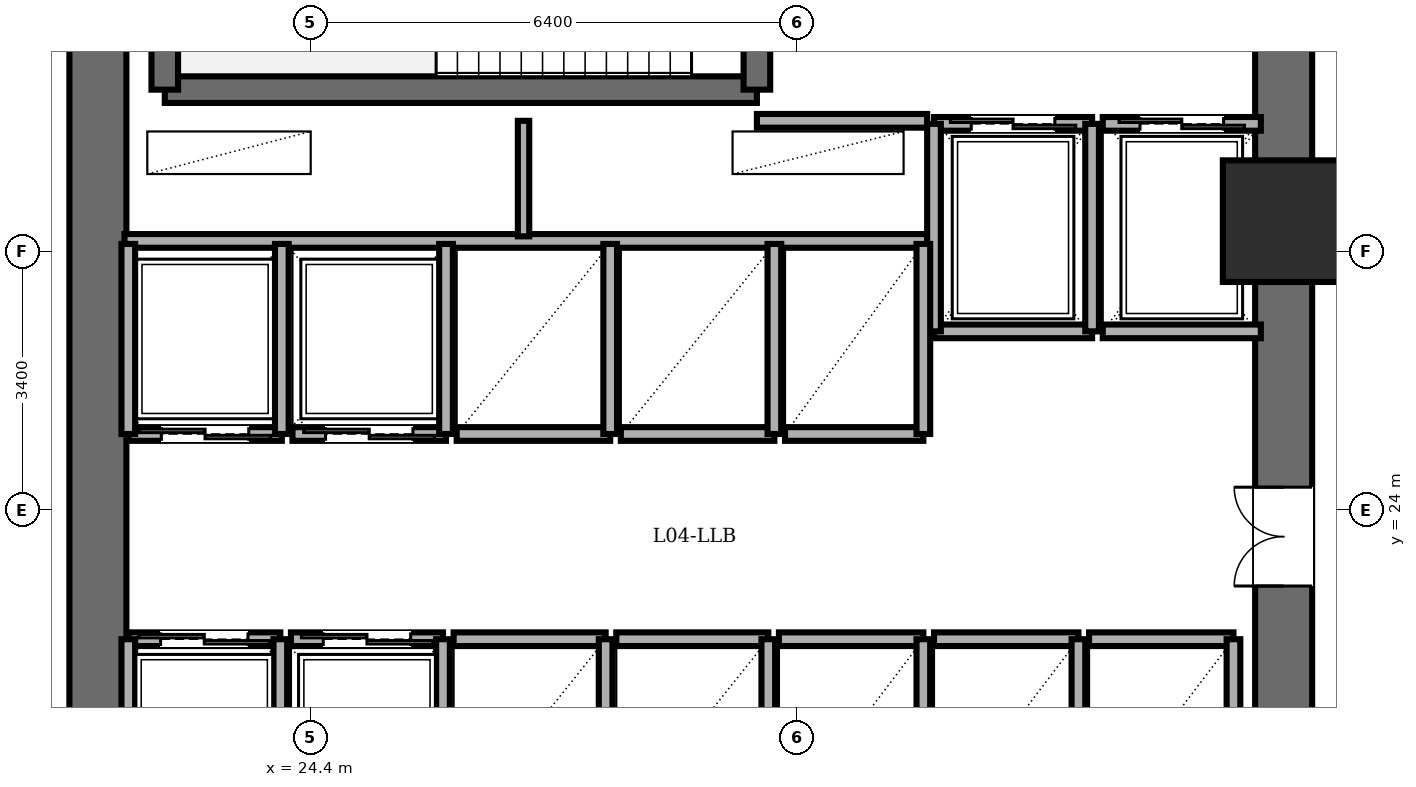
"""IFC4 building model, lengths in metres.
Left out: names, types, materials, properties, quantities, classifications, styles, units other than length and angle.
Written with IfcOpenShell. Run it as: python <this file> out.ifc"""

import sys

from ifc_helpers import new_model, si_unit, direction, frame, frame_2d, origin, origin_2d, place, context, subcontext, project, spatial, rectangle, extrude, element, fill, save


model = new_model("IFC4")
c1 = context("Model", 3, precision=1e-05, world=origin(), true_north=direction((0.0, 1.0)))
c2 = subcontext(c1, "Body", "Model", "MODEL_VIEW")
j1 = project(units=[si_unit("LENGTHUNIT", "METRE"), si_unit("PLANEANGLEUNIT", "RADIAN")], contexts=[c1])
p1 = place(None, origin())
s1 = spatial("IfcSite", under=j1, at=p1, CompositionType="ELEMENT")
p2 = place(p1, origin())
s2 = spatial("IfcBuilding", under=s1, at=p2, CompositionType="ELEMENT")
p3 = place(p2, frame((0.0, 0.0, 14.7)))
s3 = spatial("IfcBuildingStorey", under=s2, at=p3, CompositionType="ELEMENT", Elevation=14.7)
p4 = place(p3, frame((37.2, 27.8, 0.0), z_axis=(0.0, 0.0, 1.0), x_axis=(1.0, 0.0, 0.0)))
e1 = element("IfcColumn", 1, at=p4, inside=s3, PredefinedType="COLUMN", context=c2, shape_type="SweptSolid", body=[
    extrude(rectangle(XDim=1.6, YDim=1.6, at=origin_2d()), origin(), (0.0, 0.0, 1.0), 4.65),
])
p5 = place(p3, frame((21.6, 14.4, 0.0), z_axis=(0.0, 0.0, 1.0), x_axis=(0.0, 1.0, 0.0)))
e2 = element("IfcWall", 2, at=p5, inside=s3, PredefinedType="SHEAR", context=c2, shape_type="SweptSolid", body=[
    extrude(rectangle(XDim=19.2, YDim=0.75, at=frame_2d((9.6, 0.0))), origin(), (0.0, 0.0, 1.0), 4.45),
])
p6 = place(p3, frame((37.2, 14.4, 0.0), z_axis=(0.0, 0.0, 1.0), x_axis=(0.0, 1.0, 0.0)))
e3 = element("IfcWall", 3, at=p6, inside=s3, PredefinedType="SHEAR", context=c2, shape_type="SweptSolid", body=[
    extrude(rectangle(XDim=19.2, YDim=0.75, at=frame_2d((9.6, 0.0))), origin(), (0.0, 0.0, 1.0), 4.45),
])
p7 = place(p6, frame((15.8, 0.0, 0.0)))
e4 = element("IfcOpeningElement", 4, at=p7, cuts=e3, PredefinedType="OPENING", context=c2, shape_type="SweptSolid", body=[
    extrude(rectangle(XDim=1.15, YDim=2.15, at=frame_2d((0.575, 1.075))), frame((0.0, 0.385, 0.0), z_axis=(0.0, -1.0, 0.0), x_axis=(1.0, 0.0, 0.0)), (0.0, 0.0, 1.0), 0.77),
])
p8 = place(p6, frame((3.6, 0.0, 0.0)))
e5 = element("IfcOpeningElement", 5, at=p8, cuts=e3, PredefinedType="OPENING", context=c2, shape_type="SweptSolid", body=[
    extrude(rectangle(XDim=1.1, YDim=2.15, at=frame_2d((0.55, 1.075))), frame((0.0, 0.385, 0.0), z_axis=(0.0, -1.0, 0.0), x_axis=(1.0, 0.0, 0.0)), (0.0, 0.0, 1.0), 0.77),
])
p9 = place(p6, frame((8.6, 0.0, 0.0)))
e6 = element("IfcOpeningElement", 6, at=p9, cuts=e3, PredefinedType="OPENING", context=c2, shape_type="SweptSolid", body=[
    extrude(rectangle(XDim=1.3, YDim=2.2, at=frame_2d((0.65, 1.1))), frame((0.0, 0.385, 0.0), z_axis=(0.0, -1.0, 0.0), x_axis=(1.0, 0.0, 0.0)), (0.0, 0.0, 1.0), 0.77),
])
p10 = place(p3, frame((22.48, 29.53, 0.0), z_axis=(0.0, 0.0, 1.0), x_axis=(1.0, 0.0, 0.0)))
e7 = element("IfcWall", 7, at=p10, inside=s3, PredefinedType="SOLIDWALL", context=c2, shape_type="SweptSolid", body=[
    extrude(rectangle(XDim=7.79, YDim=0.35, at=frame_2d((3.895, 0.0))), origin(), (0.0, 0.0, 1.0), 4.45),
])
p11 = place(p3, frame((22.48, 29.53, 0.0), z_axis=(0.0, 0.0, 1.0), x_axis=(0.0, 1.0, 0.0)))
e8 = element("IfcWall", 8, at=p11, inside=s3, PredefinedType="SOLIDWALL", context=c2, shape_type="SweptSolid", body=[
    extrude(rectangle(XDim=3.58, YDim=0.35, at=frame_2d((1.79, 0.0))), origin(), (0.0, 0.0, 1.0), 4.45),
])
p12 = place(p3, frame((30.27, 29.53, 0.0), z_axis=(0.0, 0.0, 1.0), x_axis=(0.0, 1.0, 0.0)))
e9 = element("IfcWall", 9, at=p12, inside=s3, PredefinedType="SOLIDWALL", context=c2, shape_type="SweptSolid", body=[
    extrude(rectangle(XDim=3.58, YDim=0.35, at=frame_2d((1.79, 0.0))), origin(), (0.0, 0.0, 1.0), 4.45),
])
p13 = place(p12, frame((1.25, 0.0, 0.0)))
e10 = element("IfcOpeningElement", 10, at=p13, cuts=e9, PredefinedType="OPENING", context=c2, shape_type="SweptSolid", body=[
    extrude(rectangle(XDim=1.1, YDim=2.15, at=frame_2d((0.55, 1.075))), frame((0.0, 0.185, 0.0), z_axis=(0.0, -1.0, 0.0), x_axis=(1.0, 0.0, 0.0)), (0.0, 0.0, 1.0), 0.37),
])
p14 = place(p3, frame((30.27, 29.12, 0.0), z_axis=(0.0, 0.0, 1.0), x_axis=(1.0, 0.0, 0.0)))
e11 = element("IfcWall", 11, at=p14, inside=s3, PredefinedType="PARTITIONING", context=c2, shape_type="SweptSolid", body=[
    extrude(rectangle(XDim=2.24, YDim=0.18, at=frame_2d((1.12, 0.0))), origin(), (0.0, 0.0, 1.0), 4.45),
])
p15 = place(p3, frame((21.95, 27.54, 0.0), z_axis=(0.0, 0.0, 1.0), x_axis=(1.0, 0.0, 0.0)))
e12 = element("IfcWall", 12, at=p15, inside=s3, PredefinedType="PARTITIONING", context=c2, shape_type="SweptSolid", body=[
    extrude(rectangle(XDim=10.56, YDim=0.18, at=frame_2d((5.28, 0.0))), origin(), (0.0, 0.0, 1.0), 4.45),
])
p16 = place(p3, frame((27.2, 27.6, 0.0), z_axis=(0.0, 0.0, 1.0), x_axis=(0.0, 1.0, 0.0)))
e13 = element("IfcWall", 13, at=p16, inside=s3, PredefinedType="PARTITIONING", context=c2, shape_type="SweptSolid", body=[
    extrude(rectangle(XDim=1.52, YDim=0.15, at=frame_2d((0.76, 0.0))), origin(), (0.0, 0.0, 1.0), 4.45),
])
p17 = place(p3, frame((32.6, 29.08, 0.0), z_axis=(0.0, 0.0, 1.0), x_axis=(1.0, 0.0, 0.0)))
e14 = element("IfcWall", 14, at=p17, inside=s3, PredefinedType="PARTITIONING", context=c2, shape_type="SweptSolid", body=[
    extrude(rectangle(XDim=2.08, YDim=0.18, at=frame_2d((1.04, 0.0))), origin(), (0.0, 0.0, 1.0), 4.45),
])
p18 = place(p17, frame((0.49, 0.0, 0.0)))
e15 = element("IfcOpeningElement", 15, at=p18, cuts=e14, PredefinedType="OPENING", context=c2, shape_type="SweptSolid", body=[
    extrude(rectangle(XDim=1.1, YDim=2.2, at=frame_2d((0.55, 1.1))), frame((0.0, 0.1, 0.0), z_axis=(0.0, -1.0, 0.0), x_axis=(1.0, 0.0, 0.0)), (0.0, 0.0, 1.0), 0.2),
])
p19 = place(p3, frame((34.68, 26.35, 0.0), z_axis=(0.0, 0.0, 1.0), x_axis=(-1.0, 0.0, 0.0)))
e16 = element("IfcWall", 16, at=p19, inside=s3, PredefinedType="PARTITIONING", context=c2, shape_type="SweptSolid", body=[
    extrude(rectangle(XDim=2.08, YDim=0.18, at=frame_2d((1.04, 0.0))), origin(), (0.0, 0.0, 1.0), 4.45),
])
for number, where, z_axis, x_axis in (
    (17, (34.68, 26.35, 0.0), (0.0, 0.0, 1.0), (0.0, 1.0, 0.0)),
    (18, (32.6, 29.08, 0.0), (0.0, 0.0, 1.0), (0.0, -1.0, 0.0)),
):
    element("IfcWall", number, at=place(p3, frame(where, z_axis=z_axis, x_axis=x_axis)), inside=s3, PredefinedType="PARTITIONING", context=c2, shape_type="SweptSolid", body=[
        extrude(rectangle(XDim=2.73, YDim=0.18, at=frame_2d((1.365, 0.0))), origin(), (0.0, 0.0, 1.0), 4.45),
    ])
p20 = place(p3, frame((34.82, 29.08, 0.0), z_axis=(0.0, 0.0, 1.0), x_axis=(1.0, 0.0, 0.0)))
e19 = element("IfcWall", 19, at=p20, inside=s3, PredefinedType="PARTITIONING", context=c2, shape_type="SweptSolid", body=[
    extrude(rectangle(XDim=2.08, YDim=0.18, at=frame_2d((1.04, 0.0))), origin(), (0.0, 0.0, 1.0), 4.45),
])
p21 = place(p20, frame((0.49, 0.0, 0.0)))
e20 = element("IfcOpeningElement", 20, at=p21, cuts=e19, PredefinedType="OPENING", context=c2, shape_type="SweptSolid", body=[
    extrude(rectangle(XDim=1.1, YDim=2.2, at=frame_2d((0.55, 1.1))), frame((0.0, 0.1, 0.0), z_axis=(0.0, -1.0, 0.0), x_axis=(1.0, 0.0, 0.0)), (0.0, 0.0, 1.0), 0.2),
])
p22 = place(p3, frame((36.9, 26.35, 0.0), z_axis=(0.0, 0.0, 1.0), x_axis=(-1.0, 0.0, 0.0)))
e21 = element("IfcWall", 21, at=p22, inside=s3, PredefinedType="PARTITIONING", context=c2, shape_type="SweptSolid", body=[
    extrude(rectangle(XDim=2.08, YDim=0.18, at=frame_2d((1.04, 0.0))), origin(), (0.0, 0.0, 1.0), 4.45),
])
p23 = place(p3, frame((24.02, 25.0, 0.0), z_axis=(0.0, 0.0, 1.0), x_axis=(-1.0, 0.0, 0.0)))
e22 = element("IfcWall", 22, at=p23, inside=s3, PredefinedType="PARTITIONING", context=c2, shape_type="SweptSolid", body=[
    extrude(rectangle(XDim=2.02, YDim=0.18, at=frame_2d((1.01, 0.0))), origin(), (0.0, 0.0, 1.0), 4.45),
])
p24 = place(p23, frame((0.435, 0.0, 0.0)))
e23 = element("IfcOpeningElement", 23, at=p24, cuts=e22, PredefinedType="OPENING", context=c2, shape_type="SweptSolid", body=[
    extrude(rectangle(XDim=1.15, YDim=2.2, at=frame_2d((0.575, 1.1))), frame((0.0, 0.1, 0.0), z_axis=(0.0, -1.0, 0.0), x_axis=(1.0, 0.0, 0.0)), (0.0, 0.0, 1.0), 0.2),
])
for number, where, z_axis, x_axis in (
    (24, (24.02, 25.0, 0.0), (0.0, 0.0, 1.0), (0.0, 1.0, 0.0)),
    (25, (22.0, 27.5, 0.0), (0.0, 0.0, 1.0), (0.0, -1.0, 0.0)),
):
    element("IfcWall", number, at=place(p3, frame(where, z_axis=z_axis, x_axis=x_axis)), inside=s3, PredefinedType="PARTITIONING", context=c2, shape_type="SweptSolid", body=[
        extrude(rectangle(XDim=2.5, YDim=0.18, at=frame_2d((1.25, 0.0))), origin(), (0.0, 0.0, 1.0), 4.45),
    ])
p25 = place(p3, frame((26.18, 25.0, 0.0), z_axis=(0.0, 0.0, 1.0), x_axis=(-1.0, 0.0, 0.0)))
e26 = element("IfcWall", 26, at=p25, inside=s3, PredefinedType="PARTITIONING", context=c2, shape_type="SweptSolid", body=[
    extrude(rectangle(XDim=2.02, YDim=0.18, at=frame_2d((1.01, 0.0))), origin(), (0.0, 0.0, 1.0), 4.45),
])
p26 = place(p25, frame((0.435, 0.0, 0.0)))
e27 = element("IfcOpeningElement", 27, at=p26, cuts=e26, PredefinedType="OPENING", context=c2, shape_type="SweptSolid", body=[
    extrude(rectangle(XDim=1.15, YDim=2.2, at=frame_2d((0.575, 1.1))), frame((0.0, 0.1, 0.0), z_axis=(0.0, -1.0, 0.0), x_axis=(1.0, 0.0, 0.0)), (0.0, 0.0, 1.0), 0.2),
])
p27 = place(p3, frame((26.18, 25.0, 0.0), z_axis=(0.0, 0.0, 1.0), x_axis=(0.0, 1.0, 0.0)))
e28 = element("IfcWall", 28, at=p27, inside=s3, PredefinedType="PARTITIONING", context=c2, shape_type="SweptSolid", body=[
    extrude(rectangle(XDim=2.5, YDim=0.18, at=frame_2d((1.25, 0.0))), origin(), (0.0, 0.0, 1.0), 4.45),
])
p28 = place(p3, frame((22.0, 22.3, 0.0), z_axis=(0.0, 0.0, 1.0), x_axis=(1.0, 0.0, 0.0)))
e29 = element("IfcWall", 29, at=p28, inside=s3, PredefinedType="PARTITIONING", context=c2, shape_type="SweptSolid", body=[
    extrude(rectangle(XDim=2.0, YDim=0.18, at=frame_2d((1.0, 0.0))), origin(), (0.0, 0.0, 1.0), 4.45),
])
p29 = place(p28, frame((0.425, 0.0, 0.0)))
e30 = element("IfcOpeningElement", 30, at=p29, cuts=e29, PredefinedType="OPENING", context=c2, shape_type="SweptSolid", body=[
    extrude(rectangle(XDim=1.15, YDim=2.2, at=frame_2d((0.575, 1.1))), frame((0.0, 0.1, 0.0), z_axis=(0.0, -1.0, 0.0), x_axis=(1.0, 0.0, 0.0)), (0.0, 0.0, 1.0), 0.2),
])
for number, where, z_axis, x_axis in (
    (31, (24.0, 19.8, 0.0), (0.0, 0.0, 1.0), (0.0, 1.0, 0.0)),
    (32, (22.0, 22.3, 0.0), (0.0, 0.0, 1.0), (0.0, -1.0, 0.0)),
):
    element("IfcWall", number, at=place(p3, frame(where, z_axis=z_axis, x_axis=x_axis)), inside=s3, PredefinedType="PARTITIONING", context=c2, shape_type="SweptSolid", body=[
        extrude(rectangle(XDim=2.5, YDim=0.18, at=frame_2d((1.25, 0.0))), origin(), (0.0, 0.0, 1.0), 4.45),
    ])
p30 = place(p3, frame((24.14, 22.3, 0.0), z_axis=(0.0, 0.0, 1.0), x_axis=(1.0, 0.0, 0.0)))
e33 = element("IfcWall", 33, at=p30, inside=s3, PredefinedType="PARTITIONING", context=c2, shape_type="SweptSolid", body=[
    extrude(rectangle(XDim=2.0, YDim=0.18, at=frame_2d((1.0, 0.0))), origin(), (0.0, 0.0, 1.0), 4.45),
])
p31 = place(p30, frame((0.425, 0.0, 0.0)))
e34 = element("IfcOpeningElement", 34, at=p31, cuts=e33, PredefinedType="OPENING", context=c2, shape_type="SweptSolid", body=[
    extrude(rectangle(XDim=1.15, YDim=2.2, at=frame_2d((0.575, 1.1))), frame((0.0, 0.1, 0.0), z_axis=(0.0, -1.0, 0.0), x_axis=(1.0, 0.0, 0.0)), (0.0, 0.0, 1.0), 0.2),
])
p32 = place(p3, frame((26.14, 19.8, 0.0), z_axis=(0.0, 0.0, 1.0), x_axis=(0.0, 1.0, 0.0)))
e35 = element("IfcWall", 35, at=p32, inside=s3, PredefinedType="PARTITIONING", context=c2, shape_type="SweptSolid", body=[
    extrude(rectangle(XDim=2.5, YDim=0.18, at=frame_2d((1.25, 0.0))), origin(), (0.0, 0.0, 1.0), 4.45),
])
p33 = place(p3, frame((28.34, 25.0, 0.0), z_axis=(0.0, 0.0, 1.0), x_axis=(-1.0, 0.0, 0.0)))
e36 = element("IfcWall", 36, at=p33, inside=s3, PredefinedType="PARTITIONING", context=c2, shape_type="SweptSolid", body=[
    extrude(rectangle(XDim=2.02, YDim=0.18, at=frame_2d((1.01, 0.0))), origin(), (0.0, 0.0, 1.0), 4.45),
])
p34 = place(p3, frame((28.34, 25.0, 0.0), z_axis=(0.0, 0.0, 1.0), x_axis=(0.0, 1.0, 0.0)))
e37 = element("IfcWall", 37, at=p34, inside=s3, PredefinedType="PARTITIONING", context=c2, shape_type="SweptSolid", body=[
    extrude(rectangle(XDim=2.5, YDim=0.18, at=frame_2d((1.25, 0.0))), origin(), (0.0, 0.0, 1.0), 4.45),
])
p35 = place(p3, frame((30.5, 25.0, 0.0), z_axis=(0.0, 0.0, 1.0), x_axis=(-1.0, 0.0, 0.0)))
e38 = element("IfcWall", 38, at=p35, inside=s3, PredefinedType="PARTITIONING", context=c2, shape_type="SweptSolid", body=[
    extrude(rectangle(XDim=2.02, YDim=0.18, at=frame_2d((1.01, 0.0))), origin(), (0.0, 0.0, 1.0), 4.45),
])
p36 = place(p3, frame((30.5, 25.0, 0.0), z_axis=(0.0, 0.0, 1.0), x_axis=(0.0, 1.0, 0.0)))
e39 = element("IfcWall", 39, at=p36, inside=s3, PredefinedType="PARTITIONING", context=c2, shape_type="SweptSolid", body=[
    extrude(rectangle(XDim=2.5, YDim=0.18, at=frame_2d((1.25, 0.0))), origin(), (0.0, 0.0, 1.0), 4.45),
])
p37 = place(p3, frame((26.28, 22.3, 0.0), z_axis=(0.0, 0.0, 1.0), x_axis=(1.0, 0.0, 0.0)))
e40 = element("IfcWall", 40, at=p37, inside=s3, PredefinedType="PARTITIONING", context=c2, shape_type="SweptSolid", body=[
    extrude(rectangle(XDim=2.0, YDim=0.18, at=frame_2d((1.0, 0.0))), origin(), (0.0, 0.0, 1.0), 4.45),
])
p38 = place(p3, frame((28.28, 19.8, 0.0), z_axis=(0.0, 0.0, 1.0), x_axis=(0.0, 1.0, 0.0)))
e41 = element("IfcWall", 41, at=p38, inside=s3, PredefinedType="PARTITIONING", context=c2, shape_type="SweptSolid", body=[
    extrude(rectangle(XDim=2.5, YDim=0.18, at=frame_2d((1.25, 0.0))), origin(), (0.0, 0.0, 1.0), 4.45),
])
p39 = place(p3, frame((28.42, 22.3, 0.0), z_axis=(0.0, 0.0, 1.0), x_axis=(1.0, 0.0, 0.0)))
e42 = element("IfcWall", 42, at=p39, inside=s3, PredefinedType="PARTITIONING", context=c2, shape_type="SweptSolid", body=[
    extrude(rectangle(XDim=2.0, YDim=0.18, at=frame_2d((1.0, 0.0))), origin(), (0.0, 0.0, 1.0), 4.45),
])
p40 = place(p3, frame((30.42, 19.8, 0.0), z_axis=(0.0, 0.0, 1.0), x_axis=(0.0, 1.0, 0.0)))
e43 = element("IfcWall", 43, at=p40, inside=s3, PredefinedType="PARTITIONING", context=c2, shape_type="SweptSolid", body=[
    extrude(rectangle(XDim=2.5, YDim=0.18, at=frame_2d((1.25, 0.0))), origin(), (0.0, 0.0, 1.0), 4.45),
])
p41 = place(p3, frame((32.46, 25.0, 0.0), z_axis=(0.0, 0.0, 1.0), x_axis=(-1.0, 0.0, 0.0)))
e44 = element("IfcWall", 44, at=p41, inside=s3, PredefinedType="PARTITIONING", context=c2, shape_type="SweptSolid", body=[
    extrude(rectangle(XDim=1.82, YDim=0.18, at=frame_2d((0.91, 0.0))), origin(), (0.0, 0.0, 1.0), 4.45),
])
p42 = place(p3, frame((32.46, 25.0, 0.0), z_axis=(0.0, 0.0, 1.0), x_axis=(0.0, 1.0, 0.0)))
e45 = element("IfcWall", 45, at=p42, inside=s3, PredefinedType="PARTITIONING", context=c2, shape_type="SweptSolid", body=[
    extrude(rectangle(XDim=2.5, YDim=0.18, at=frame_2d((1.25, 0.0))), origin(), (0.0, 0.0, 1.0), 4.45),
])
p43 = place(p3, frame((30.56, 22.3, 0.0), z_axis=(0.0, 0.0, 1.0), x_axis=(1.0, 0.0, 0.0)))
e46 = element("IfcWall", 46, at=p43, inside=s3, PredefinedType="PARTITIONING", context=c2, shape_type="SweptSolid", body=[
    extrude(rectangle(XDim=1.9, YDim=0.18, at=frame_2d((0.95, 0.0))), origin(), (0.0, 0.0, 1.0), 4.45),
])
p44 = place(p3, frame((32.46, 19.8, 0.0), z_axis=(0.0, 0.0, 1.0), x_axis=(0.0, 1.0, 0.0)))
e47 = element("IfcWall", 47, at=p44, inside=s3, PredefinedType="PARTITIONING", context=c2, shape_type="SweptSolid", body=[
    extrude(rectangle(XDim=2.5, YDim=0.18, at=frame_2d((1.25, 0.0))), origin(), (0.0, 0.0, 1.0), 4.45),
])
p45 = place(p3, frame((32.6, 22.3, 0.0), z_axis=(0.0, 0.0, 1.0), x_axis=(1.0, 0.0, 0.0)))
e48 = element("IfcWall", 48, at=p45, inside=s3, PredefinedType="PARTITIONING", context=c2, shape_type="SweptSolid", body=[
    extrude(rectangle(XDim=1.9, YDim=0.18, at=frame_2d((0.95, 0.0))), origin(), (0.0, 0.0, 1.0), 4.45),
])
p46 = place(p3, frame((34.5, 19.8, 0.0), z_axis=(0.0, 0.0, 1.0), x_axis=(0.0, 1.0, 0.0)))
e49 = element("IfcWall", 49, at=p46, inside=s3, PredefinedType="PARTITIONING", context=c2, shape_type="SweptSolid", body=[
    extrude(rectangle(XDim=2.5, YDim=0.18, at=frame_2d((1.25, 0.0))), origin(), (0.0, 0.0, 1.0), 4.45),
])
p47 = place(p3, frame((34.64, 22.3, 0.0), z_axis=(0.0, 0.0, 1.0), x_axis=(1.0, 0.0, 0.0)))
e50 = element("IfcWall", 50, at=p47, inside=s3, PredefinedType="PARTITIONING", context=c2, shape_type="SweptSolid", body=[
    extrude(rectangle(XDim=1.9, YDim=0.18, at=frame_2d((0.95, 0.0))), origin(), (0.0, 0.0, 1.0), 4.45),
])
p48 = place(p3, frame((36.54, 19.8, 0.0), z_axis=(0.0, 0.0, 1.0), x_axis=(0.0, 1.0, 0.0)))
e51 = element("IfcWall", 51, at=p48, inside=s3, PredefinedType="PARTITIONING", context=c2, shape_type="SweptSolid", body=[
    extrude(rectangle(XDim=2.5, YDim=0.18, at=frame_2d((1.25, 0.0))), origin(), (0.0, 0.0, 1.0), 4.45),
])
p49 = place(p18, origin())
e52 = element("IfcDoor", 52, at=p49, inside=s3, OperationType="DOUBLE_DOOR_SLIDING", PredefinedType="DOOR", context=c2, shape_type="SweptSolid", body=[
    extrude(rectangle(XDim=1.1, YDim=2.2, at=frame_2d((0.55, 1.1))), frame((0.0, 0.025, 0.0), z_axis=(0.0, -1.0, 0.0), x_axis=(1.0, 0.0, 0.0)), (0.0, 0.0, 1.0), 0.05),
])
fill(e15, e52)
p50 = place(p21, origin())
e53 = element("IfcDoor", 53, at=p50, inside=s3, OperationType="DOUBLE_DOOR_SLIDING", PredefinedType="DOOR", context=c2, shape_type="SweptSolid", body=[
    extrude(rectangle(XDim=1.1, YDim=2.2, at=frame_2d((0.55, 1.1))), frame((0.0, 0.025, 0.0), z_axis=(0.0, -1.0, 0.0), x_axis=(1.0, 0.0, 0.0)), (0.0, 0.0, 1.0), 0.05),
])
fill(e20, e53)
p51 = place(p24, origin())
e54 = element("IfcDoor", 54, at=p51, inside=s3, OperationType="DOUBLE_DOOR_SLIDING", PredefinedType="DOOR", context=c2, shape_type="SweptSolid", body=[
    extrude(rectangle(XDim=1.15, YDim=2.2, at=frame_2d((0.575, 1.1))), frame((0.0, 0.025, 0.0), z_axis=(0.0, -1.0, 0.0), x_axis=(1.0, 0.0, 0.0)), (0.0, 0.0, 1.0), 0.05),
])
fill(e23, e54)
p52 = place(p26, origin())
e55 = element("IfcDoor", 55, at=p52, inside=s3, OperationType="DOUBLE_DOOR_SLIDING", PredefinedType="DOOR", context=c2, shape_type="SweptSolid", body=[
    extrude(rectangle(XDim=1.15, YDim=2.2, at=frame_2d((0.575, 1.1))), frame((0.0, 0.025, 0.0), z_axis=(0.0, -1.0, 0.0), x_axis=(1.0, 0.0, 0.0)), (0.0, 0.0, 1.0), 0.05),
])
fill(e27, e55)
p53 = place(p29, origin())
e56 = element("IfcDoor", 56, at=p53, inside=s3, OperationType="DOUBLE_DOOR_SLIDING", PredefinedType="DOOR", context=c2, shape_type="SweptSolid", body=[
    extrude(rectangle(XDim=1.15, YDim=2.2, at=frame_2d((0.575, 1.1))), frame((0.0, 0.025, 0.0), z_axis=(0.0, -1.0, 0.0), x_axis=(1.0, 0.0, 0.0)), (0.0, 0.0, 1.0), 0.05),
])
fill(e30, e56)
p54 = place(p31, origin())
e57 = element("IfcDoor", 57, at=p54, inside=s3, OperationType="DOUBLE_DOOR_SLIDING", PredefinedType="DOOR", context=c2, shape_type="SweptSolid", body=[
    extrude(rectangle(XDim=1.15, YDim=2.2, at=frame_2d((0.575, 1.1))), frame((0.0, 0.025, 0.0), z_axis=(0.0, -1.0, 0.0), x_axis=(1.0, 0.0, 0.0)), (0.0, 0.0, 1.0), 0.05),
])
fill(e34, e57)
p55 = place(p9, origin())
e58 = element("IfcDoor", 58, at=p55, inside=s3, OperationType="DOUBLE_DOOR_SINGLE_SWING", PredefinedType="DOOR", context=c2, shape_type="SweptSolid", body=[
    extrude(rectangle(XDim=1.3, YDim=2.2, at=frame_2d((0.65, 1.1))), frame((0.0, 0.025, 0.0), z_axis=(0.0, -1.0, 0.0), x_axis=(1.0, 0.0, 0.0)), (0.0, 0.0, 1.0), 0.05),
])
fill(e6, e58)
save(model, sys.argv[1])
